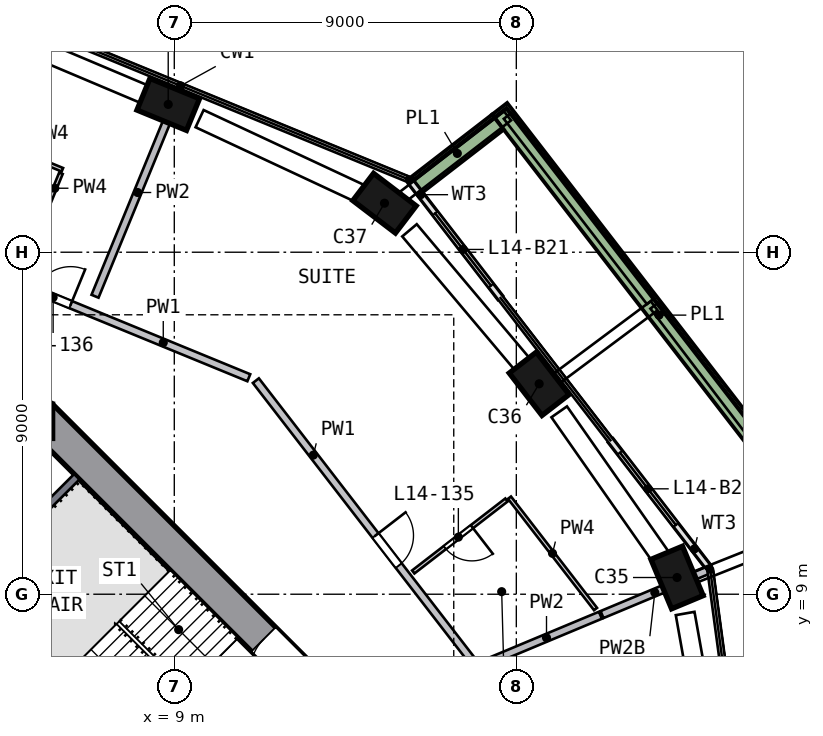
"""IFC4 building model, lengths in metres.
Left out: names, types, materials, properties, quantities, classifications, styles, units other than length and angle.
Written with IfcOpenShell. Run it as: python <this file> out.ifc"""

import sys

from ifc_helpers import new_model, si_unit, direction, frame, frame_2d, origin, origin_2d, place, context, subcontext, project, spatial, rectangle, extrude, element, fill, save


model = new_model("IFC4")
c1 = context("Model", 3, precision=1e-05, world=origin(), true_north=direction((0.0, 1.0)))
c2 = subcontext(c1, "Body", "Model", "MODEL_VIEW")
j1 = project(units=[si_unit("LENGTHUNIT", "METRE"), si_unit("PLANEANGLEUNIT", "RADIAN")], contexts=[c1])
p1 = place(None, origin())
s1 = spatial("IfcSite", under=j1, at=p1, CompositionType="ELEMENT")
p2 = place(p1, origin())
s2 = spatial("IfcBuilding", under=s1, at=p2, CompositionType="ELEMENT")
p3 = place(p2, frame((0.0, 0.0, 64.5)))
s3 = spatial("IfcBuildingStorey", under=s2, at=p3, CompositionType="ELEMENT", Elevation=64.5)
p4 = place(p3, frame((22.284, 9.312, 0.0), z_axis=(-0.045160656, 0.105602947, 0.99338237), x_axis=(0.382830166, -0.916651807, 0.114850029)))
e1 = element("IfcColumn", 1, at=p4, inside=s3, PredefinedType="COLUMN", context=c2, shape_type="SweptSolid", body=[
    extrude(rectangle(XDim=1.4, YDim=0.9, at=origin_2d()), origin(), (0.0, 0.0, 1.0), 3.211),
])
p5 = place(p3, frame((18.685, 14.431, 0.0), z_axis=(-0.06935812, 0.088294712, 0.993676756), x_axis=(-0.607173413, 0.786596999, -0.112274703)))
e2 = element("IfcColumn", 2, at=p5, inside=s3, PredefinedType="COLUMN", context=c2, shape_type="SweptSolid", body=[
    extrude(rectangle(XDim=1.4, YDim=0.9, at=origin_2d()), origin(), (0.0, 0.0, 1.0), 3.21),
])
p6 = place(p3, frame((14.642, 19.207, 0.0), z_axis=(-0.091917805, 0.068881333, 0.993381336), x_axis=(0.789856126, -0.602440635, 0.114858968)))
e3 = element("IfcColumn", 3, at=p6, inside=s3, PredefinedType="COLUMN", context=c2, shape_type="SweptSolid", body=[
    extrude(rectangle(XDim=1.4, YDim=0.9, at=origin_2d()), origin(), (0.0, 0.0, 1.0), 3.211),
])
p7 = place(p3, frame((8.966, 21.84, 0.0), z_axis=(-0.104264917, 0.041751597, 0.993672799), x_axis=(-0.919295603, 0.377203026, -0.112309715)))
e4 = element("IfcColumn", 4, at=p7, inside=s3, PredefinedType="COLUMN", context=c2, shape_type="SweptSolid", body=[
    extrude(rectangle(XDim=1.4, YDim=0.9, at=origin_2d()), origin(), (0.0, 0.0, 1.0), 3.21),
])
p8 = place(p3, frame((13.682, 5.481, 0.0), z_axis=(0.0, 0.0, 1.0), x_axis=(-0.707106781, 0.707106781, 0.0)))
e5 = element("IfcWall", 5, at=p8, inside=s3, PredefinedType="SHEAR", context=c2, shape_type="SweptSolid", body=[
    extrude(rectangle(XDim=11.598, YDim=0.9, at=frame_2d((5.799, 0.0))), origin(), (0.0, 0.0, 1.0), 3.5),
])
p9 = place(p8, frame((2.099, 0.0, 0.0)))
e6 = element("IfcOpeningElement", 6, at=p9, cuts=e5, PredefinedType="OPENING", context=c2, shape_type="SweptSolid", body=[
    extrude(rectangle(XDim=1.2, YDim=2.1, at=frame_2d((0.6, 1.05))), frame((0.0, 0.46, 0.0), z_axis=(0.0, -1.0, 0.0), x_axis=(1.0, 0.0, 0.0)), (0.0, 0.0, 1.0), 0.92),
])
p10 = place(p3, frame((5.799, 13.55, 0.0), z_axis=(0.0, 0.0, 1.0), x_axis=(-1.0, 0.0, 0.0)))
e7 = element("IfcWall", 7, at=p10, inside=s3, PredefinedType="SHEAR", context=c2, shape_type="SweptSolid", body=[
    extrude(rectangle(XDim=11.598, YDim=0.9, at=frame_2d((5.799, 0.0))), origin(), (0.0, 0.0, 1.0), 3.5),
])
p11 = place(p10, frame((4.899, 0.0, 0.0)))
e8 = element("IfcOpeningElement", 8, at=p11, cuts=e7, PredefinedType="OPENING", context=c2, shape_type="SweptSolid", body=[
    extrude(rectangle(XDim=1.8, YDim=2.1, at=frame_2d((0.9, 1.05))), frame((0.0, 0.46, 0.0), z_axis=(0.0, -1.0, 0.0), x_axis=(1.0, 0.0, 0.0)), (0.0, 0.0, 1.0), 0.92),
])
p12 = place(p3, frame((23.052, 9.717, 0.0), z_axis=(0.0, 0.0, 1.0), x_axis=(-0.611243928, 0.791442266, 0.0)))
e9 = element("IfcWall", 9, at=p12, inside=s3, PredefinedType="SOLIDWALL", context=c2, shape_type="SweptSolid", body=[
    extrude(rectangle(XDim=4.199, YDim=0.15, at=frame_2d((2.099, 0.0))), origin(), (0.0, 0.0, 1.0), 2.425),
])
p13 = place(p12, frame((1.399, 0.0, 0.0)))
e10 = element("IfcOpeningElement", 10, at=p13, cuts=e9, PredefinedType="OPENING", context=c2, shape_type="SweptSolid", body=[
    extrude(rectangle(XDim=2.4, YDim=2.4, at=frame_2d((1.2, 1.2))), frame((0.0, 0.085, 0.0), z_axis=(0.0, -1.0, 0.0), x_axis=(1.0, 0.0, 0.0)), (0.0, 0.0, 1.0), 0.17),
])
p14 = place(p3, frame((17.576, 16.807, 0.0), z_axis=(0.0, 0.0, 1.0), x_axis=(-0.611226819, 0.791455479, 0.0)))
e11 = element("IfcWall", 11, at=p14, inside=s3, PredefinedType="SOLIDWALL", context=c2, shape_type="SweptSolid", body=[
    extrude(rectangle(XDim=3.842, YDim=0.15, at=frame_2d((1.921, 0.0))), origin(), (0.0, 0.0, 1.0), 2.425),
])
p15 = place(p14, frame((0.4, 0.0, 0.0)))
e12 = element("IfcOpeningElement", 12, at=p15, cuts=e11, PredefinedType="OPENING", context=c2, shape_type="SweptSolid", body=[
    extrude(rectangle(XDim=2.4, YDim=2.4, at=frame_2d((1.2, 1.2))), frame((0.0, 0.085, 0.0), z_axis=(0.0, -1.0, 0.0), x_axis=(1.0, 0.0, 0.0)), (0.0, 0.0, 1.0), 0.17),
])
p16 = place(p3, frame((25.949, 10.914, 0.0), z_axis=(0.0, 0.0, 1.0), x_axis=(-0.611254575, 0.791434043, 0.0)))
e13 = element("IfcWall", 13, at=p16, inside=s3, PredefinedType="SOLIDWALL", context=c2, shape_type="SweptSolid", body=[
    extrude(rectangle(XDim=13.723, YDim=0.5, at=frame_2d((6.862, 0.0))), origin(), (0.0, 0.0, 1.0), 0.7),
])
p17 = place(p3, frame((17.515, 21.425, 0.0), z_axis=(0.0, 0.0, 1.0), x_axis=(-0.791398379, -0.611300748, 0.0)))
e14 = element("IfcWall", 14, at=p17, inside=s3, PredefinedType="SOLIDWALL", context=c2, shape_type="SweptSolid", body=[
    extrude(rectangle(XDim=2.699, YDim=0.5, at=frame_2d((1.35, 0.0))), origin(), (0.0, 0.0, 1.0), 0.7),
])
p18 = place(p3, frame((3.535, 9.334, 0.0), z_axis=(0.0, 0.0, 1.0), x_axis=(0.707106781, -0.707106781, 0.0)))
e15 = element("IfcWall", 15, at=p18, inside=s3, PredefinedType="SOLIDWALL", context=c2, shape_type="SweptSolid", body=[
    extrude(rectangle(XDim=8.2, YDim=0.2, at=frame_2d((4.1, 0.0))), origin(), (0.0, 0.0, 1.0), 3.19),
])
p19 = place(p18, frame((6.6, 0.0, 0.0)))
e16 = element("IfcOpeningElement", 16, at=p19, cuts=e15, PredefinedType="OPENING", context=c2, shape_type="SweptSolid", body=[
    extrude(rectangle(XDim=1.2, YDim=2.1, at=frame_2d((0.6, 1.05))), frame((0.0, 0.11, 0.0), z_axis=(0.0, -1.0, 0.0), x_axis=(1.0, 0.0, 0.0)), (0.0, 0.0, 1.0), 0.22),
])
p20 = place(p3, frame((3.677, 9.334, 0.0), z_axis=(0.0, 0.0, 1.0), x_axis=(0.707106781, 0.707106781, 0.0)))
e17 = element("IfcWall", 17, at=p20, inside=s3, PredefinedType="SOLIDWALL", context=c2, shape_type="SweptSolid", body=[
    extrude(rectangle(XDim=3.9, YDim=0.2, at=frame_2d((1.95, 0.0))), origin(), (0.0, 0.0, 1.0), 3.19),
])
p21 = place(p3, frame((2.342, 18.235, 0.0), z_axis=(0.0, 0.0, 1.0), x_axis=(0.925090025, -0.37974787, 0.0)))
e18 = element("IfcWall", 18, at=p21, inside=s3, PredefinedType="SOLIDWALL", context=c2, shape_type="SweptSolid", body=[
    extrude(rectangle(XDim=9.316, YDim=0.2, at=frame_2d((4.658, 0.0))), origin(), (0.0, 0.0, 1.0), 3.19),
])
p22 = place(p21, frame((3.25, 0.0, 0.0)))
e19 = element("IfcOpeningElement", 19, at=p22, cuts=e18, PredefinedType="OPENING", context=c2, shape_type="SweptSolid", body=[
    extrude(rectangle(XDim=1.0, YDim=2.1, at=frame_2d((0.5, 1.05))), frame((0.0, 0.11, 0.0), z_axis=(0.0, -1.0, 0.0), x_axis=(1.0, 0.0, 0.0)), (0.0, 0.0, 1.0), 0.22),
])
p23 = place(p3, frame((11.146, 14.62, 0.0), z_axis=(0.0, 0.0, 1.0), x_axis=(0.611244608, -0.791441741, 0.0)))
e20 = element("IfcWall", 20, at=p23, inside=s3, PredefinedType="SOLIDWALL", context=c2, shape_type="SweptSolid", body=[
    extrude(rectangle(XDim=9.316, YDim=0.2, at=frame_2d((4.658, 0.0))), origin(), (0.0, 0.0, 1.0), 3.19),
])
p24 = place(p23, frame((5.15, 0.0, 0.0)))
e21 = element("IfcOpeningElement", 21, at=p24, cuts=e20, PredefinedType="OPENING", context=c2, shape_type="SweptSolid", body=[
    extrude(rectangle(XDim=1.0, YDim=2.1, at=frame_2d((0.5, 1.05))), frame((0.0, 0.11, 0.0), z_axis=(0.0, -1.0, 0.0), x_axis=(1.0, 0.0, 0.0)), (0.0, 0.0, 1.0), 0.22),
])
p25 = place(p3, frame((6.914, 16.842, 0.0), z_axis=(0.0, 0.0, 1.0), x_axis=(0.379776022, 0.925078469, 0.0)))
e22 = element("IfcWall", 22, at=p25, inside=s3, PredefinedType="SOLIDWALL", context=c2, shape_type="SweptSolid", body=[
    extrude(rectangle(XDim=5.903, YDim=0.2, at=frame_2d((2.951, 0.0))), origin(), (0.0, 0.0, 1.0), 3.19),
])
p26 = place(p3, frame((17.376, 7.261, 0.0), z_axis=(0.0, 0.0, 1.0), x_axis=(0.922644096, 0.385652528, 0.0)))
e23 = element("IfcWall", 23, at=p26, inside=s3, PredefinedType="SOLIDWALL", context=c2, shape_type="SweptSolid", body=[
    extrude(rectangle(XDim=3.075, YDim=0.2, at=frame_2d((1.537, 0.0))), origin(), (0.0, 0.0, 1.0), 3.19),
])
p27 = place(p3, frame((20.255, 8.465, 0.0), z_axis=(0.0, 0.0, 1.0), x_axis=(0.922675862, 0.385576522, 0.0)))
e24 = element("IfcWall", 24, at=p27, inside=s3, PredefinedType="SOLIDWALL", context=c2, shape_type="SweptSolid", body=[
    extrude(rectangle(XDim=3.011, YDim=0.2, at=frame_2d((1.506, 0.0))), origin(), (0.0, 0.0, 1.0), 2.69),
])
p28 = place(p3, frame((2.956, 21.442, 0.0), z_axis=(0.0, 0.0, 1.0), x_axis=(0.925097084, -0.379730674, 0.0)))
e25 = element("IfcWall", 25, at=p28, inside=s3, PredefinedType="PARTITIONING", context=c2, shape_type="SweptSolid", body=[
    extrude(rectangle(XDim=3.35, YDim=0.1, at=frame_2d((1.675, 0.0))), origin(), (0.0, 0.0, 1.0), 3.19),
])
p29 = place(p3, frame((4.916, 17.395, 0.0), z_axis=(0.0, 0.0, 1.0), x_axis=(0.379750343, 0.92508901, 0.0)))
e26 = element("IfcWall", 26, at=p29, inside=s3, PredefinedType="PARTITIONING", context=c2, shape_type="SweptSolid", body=[
    extrude(rectangle(XDim=2.9, YDim=0.1, at=frame_2d((1.45, 0.0))), origin(), (0.0, 0.0, 1.0), 3.19),
])
p30 = place(p29, frame((0.95, 0.0, 0.0)))
e27 = element("IfcOpeningElement", 27, at=p30, cuts=e26, PredefinedType="OPENING", context=c2, shape_type="SweptSolid", body=[
    extrude(rectangle(XDim=0.9, YDim=2.1, at=frame_2d((0.45, 1.05))), frame((0.0, 0.06, 0.0), z_axis=(0.0, -1.0, 0.0), x_axis=(1.0, 0.0, 0.0)), (0.0, 0.0, 1.0), 0.12),
])
p31 = place(p3, frame((17.741, 11.48, 0.0), z_axis=(0.0, 0.0, 1.0), x_axis=(-0.791472017, -0.611205405, 0.0)))
e28 = element("IfcWall", 28, at=p31, inside=s3, PredefinedType="PARTITIONING", context=c2, shape_type="SweptSolid", body=[
    extrude(rectangle(XDim=3.1, YDim=0.1, at=frame_2d((1.55, 0.0))), origin(), (0.0, 0.0, 1.0), 3.19),
])
p32 = place(p31, frame((1.15, 0.0, 0.0)))
e29 = element("IfcOpeningElement", 29, at=p32, cuts=e28, PredefinedType="OPENING", context=c2, shape_type="SweptSolid", body=[
    extrude(rectangle(XDim=0.9, YDim=2.1, at=frame_2d((0.45, 1.05))), frame((0.0, 0.06, 0.0), z_axis=(0.0, -1.0, 0.0), x_axis=(1.0, 0.0, 0.0)), (0.0, 0.0, 1.0), 0.12),
])
p33 = place(p3, frame((17.82, 11.542, 0.0), z_axis=(0.0, 0.0, 1.0), x_axis=(0.611235492, -0.791448781, 0.0)))
e30 = element("IfcWall", 30, at=p33, inside=s3, PredefinedType="PARTITIONING", context=c2, shape_type="SweptSolid", body=[
    extrude(rectangle(XDim=3.704, YDim=0.1, at=frame_2d((1.852, 0.0))), origin(), (0.0, 0.0, 1.0), 3.19),
])
p34 = place(p13, origin())
e31 = element("IfcDoor", 31, at=p34, inside=s3, OperationType="SLIDING_TO_LEFT", PredefinedType="DOOR", context=c2, shape_type="SweptSolid", body=[
    extrude(rectangle(XDim=2.4, YDim=2.4, at=frame_2d((1.2, 1.2))), frame((0.0, 0.025, 0.0), z_axis=(0.0, -1.0, 0.0), x_axis=(1.0, 0.0, 0.0)), (0.0, 0.0, 1.0), 0.05),
])
fill(e10, e31)
p35 = place(p15, origin())
e32 = element("IfcDoor", 32, at=p35, inside=s3, OperationType="SLIDING_TO_RIGHT", PredefinedType="DOOR", context=c2, shape_type="SweptSolid", body=[
    extrude(rectangle(XDim=2.4, YDim=2.4, at=frame_2d((1.2, 1.2))), frame((0.0, 0.025, 0.0), z_axis=(0.0, -1.0, 0.0), x_axis=(1.0, 0.0, 0.0)), (0.0, 0.0, 1.0), 0.05),
])
fill(e12, e32)
p36 = place(p9, origin())
e33 = element("IfcDoor", 33, at=p36, inside=s3, OperationType="SINGLE_SWING_LEFT", PredefinedType="DOOR", context=c2, shape_type="SweptSolid", body=[
    extrude(rectangle(XDim=1.2, YDim=2.1, at=frame_2d((0.6, 1.05))), frame((0.0, 0.025, 0.0), z_axis=(0.0, -1.0, 0.0), x_axis=(1.0, 0.0, 0.0)), (0.0, 0.0, 1.0), 0.05),
])
fill(e6, e33)
p37 = place(p24, origin())
e34 = element("IfcDoor", 34, at=p37, inside=s3, OperationType="SINGLE_SWING_LEFT", PredefinedType="DOOR", context=c2, shape_type="SweptSolid", body=[
    extrude(rectangle(XDim=1.0, YDim=2.1, at=frame_2d((0.5, 1.05))), frame((0.0, 0.025, 0.0), z_axis=(0.0, -1.0, 0.0), x_axis=(1.0, 0.0, 0.0)), (0.0, 0.0, 1.0), 0.05),
])
fill(e21, e34)
p38 = place(p32, origin())
e35 = element("IfcDoor", 35, at=p38, inside=s3, OperationType="SINGLE_SWING_LEFT", PredefinedType="DOOR", context=c2, shape_type="SweptSolid", body=[
    extrude(rectangle(XDim=0.9, YDim=2.1, at=frame_2d((0.45, 1.05))), frame((0.0, 0.025, 0.0), z_axis=(0.0, -1.0, 0.0), x_axis=(1.0, 0.0, 0.0)), (0.0, 0.0, 1.0), 0.05),
])
fill(e29, e35)
p39 = place(p22, origin())
e36 = element("IfcDoor", 36, at=p39, inside=s3, OperationType="SINGLE_SWING_RIGHT", PredefinedType="DOOR", context=c2, shape_type="SweptSolid", body=[
    extrude(rectangle(XDim=1.0, YDim=2.1, at=frame_2d((0.5, 1.05))), frame((0.0, 0.025, 0.0), z_axis=(0.0, -1.0, 0.0), x_axis=(1.0, 0.0, 0.0)), (0.0, 0.0, 1.0), 0.05),
])
fill(e19, e36)
save(model, sys.argv[1])
